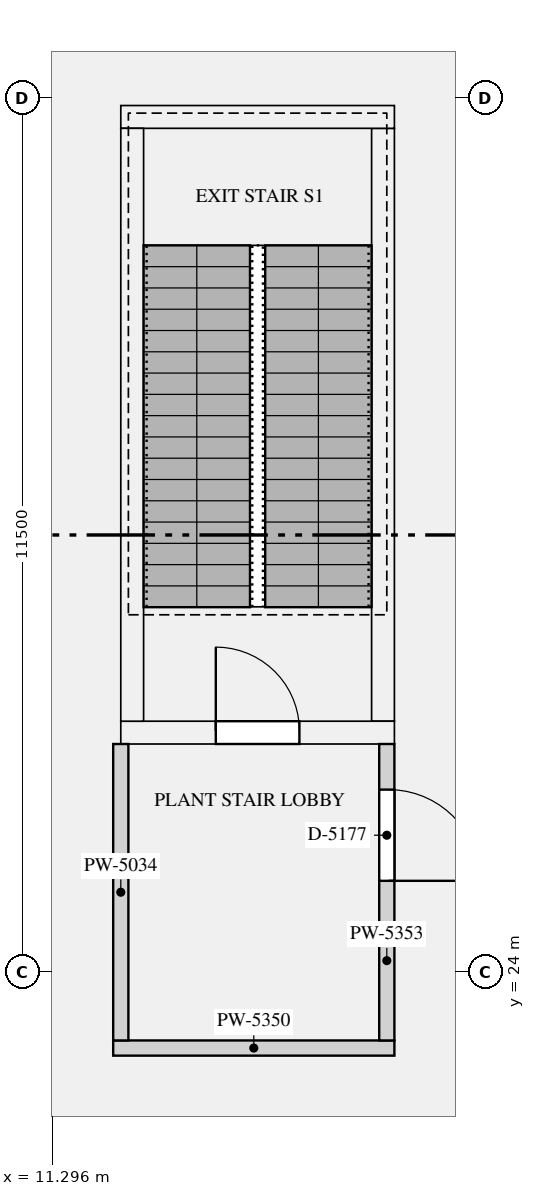
"""IFC4 building model, lengths in metres.
Left out: names, types, materials, properties, quantities, classifications, styles, units other than length and angle.
Written with IfcOpenShell. Run it as: python <this file> out.ifc"""

import sys

from ifc_helpers import new_model, si_unit, direction, frame, frame_2d, origin, origin_2d, place, context, subcontext, project, spatial, rectangle, extrude, element, fill, save


model = new_model("IFC4")
c1 = context("Model", 3, precision=1e-05, world=origin(), true_north=direction((0.0, 1.0)))
c2 = subcontext(c1, "Body", "Model", "MODEL_VIEW")
j1 = project(units=[si_unit("LENGTHUNIT", "METRE"), si_unit("PLANEANGLEUNIT", "RADIAN")], contexts=[c1])
p1 = place(None, origin())
s1 = spatial("IfcSite", under=j1, at=p1, CompositionType="ELEMENT")
p2 = place(p1, origin())
s2 = spatial("IfcBuilding", under=s1, at=p2, CompositionType="ELEMENT")
p3 = place(p2, frame((0.0, 0.0, 185.4)))
s3 = spatial("IfcBuildingStorey", under=s2, at=p3, CompositionType="ELEMENT", Elevation=185.4)
for number, where, z_axis, x_axis in (
    (1, (7.14, 28.5, -0.295), (0.579, 0.0, 0.815), (0.0, 1.0, 0.0)),
    (2, (7.14, 24.5, -0.295), (0.579, 0.0, 0.815), (0.0, 1.0, 0.0)),
):
    element("IfcColumn", number, at=place(p3, frame(where, z_axis=z_axis, x_axis=x_axis)), inside=s3, PredefinedType="USERDEFINED", context=c2, shape_type="SweptSolid", body=[
        extrude(rectangle(XDim=1.0, YDim=0.7, at=origin_2d()), origin(), (0.0, 0.0, 1.0), 7.839),
    ])
p4 = place(p3, frame((12.2, 27.15, 0.0), z_axis=(0.0, 0.0, 1.0), x_axis=(1.0, 0.0, 0.0)))
e3 = element("IfcWall", 3, at=p4, inside=s3, PredefinedType="SHEAR", context=c2, shape_type="SweptSolid", body=[
    extrude(rectangle(XDim=3.6, YDim=0.3, at=frame_2d((1.8, 0.0))), origin(), (0.0, 0.0, 1.0), 6.3),
])
p5 = place(p4, frame((1.25, 0.0, 0.0)))
e4 = element("IfcOpeningElement", 4, at=p5, cuts=e3, PredefinedType="OPENING", context=c2, shape_type="SweptSolid", body=[
    extrude(rectangle(XDim=1.1, YDim=2.1, at=frame_2d((0.55, 1.05))), frame((0.0, 0.16, 0.0), z_axis=(0.0, -1.0, 0.0), x_axis=(1.0, 0.0, 0.0)), (0.0, 0.0, 1.0), 0.32),
])
p6 = place(p3, frame((12.2, 35.25, 0.0), z_axis=(0.0, 0.0, 1.0), x_axis=(1.0, 0.0, 0.0)))
e5 = element("IfcWall", 5, at=p6, inside=s3, PredefinedType="SHEAR", context=c2, shape_type="SweptSolid", body=[
    extrude(rectangle(XDim=3.6, YDim=0.3, at=frame_2d((1.8, 0.0))), origin(), (0.0, 0.0, 1.0), 6.3),
])
for number, where, z_axis, x_axis in (
    (6, (12.35, 27.3, 0.0), (0.0, 0.0, 1.0), (0.0, 1.0, 0.0)),
    (7, (15.65, 27.3, 0.0), (0.0, 0.0, 1.0), (0.0, 1.0, 0.0)),
):
    element("IfcWall", number, at=place(p3, frame(where, z_axis=z_axis, x_axis=x_axis)), inside=s3, PredefinedType="SHEAR", context=c2, shape_type="SweptSolid", body=[
        extrude(rectangle(XDim=7.8, YDim=0.3, at=frame_2d((3.9, 0.0))), origin(), (0.0, 0.0, 1.0), 6.3),
    ])
p7 = place(p3, frame((12.1, 23.0, 0.0), z_axis=(0.0, 0.0, 1.0), x_axis=(1.0, 0.0, 0.0)))
e8 = element("IfcWall", 8, at=p7, inside=s3, PredefinedType="PARTITIONING", context=c2, shape_type="SweptSolid", body=[
    extrude(rectangle(XDim=3.7, YDim=0.2, at=frame_2d((1.85, 0.0))), origin(), (0.0, 0.0, 1.0), 5.8),
])
p8 = place(p3, frame((12.2, 23.1, 0.0), z_axis=(0.0, 0.0, 1.0), x_axis=(0.0, 1.0, 0.0)))
e9 = element("IfcWall", 9, at=p8, inside=s3, PredefinedType="PARTITIONING", context=c2, shape_type="SweptSolid", body=[
    extrude(rectangle(XDim=3.9, YDim=0.2, at=frame_2d((1.95, 0.0))), origin(), (0.0, 0.0, 1.0), 5.8),
])
p9 = place(p3, frame((15.7, 23.1, 0.0), z_axis=(0.0, 0.0, 1.0), x_axis=(0.0, 1.0, 0.0)))
e10 = element("IfcWall", 10, at=p9, inside=s3, PredefinedType="PARTITIONING", context=c2, shape_type="SweptSolid", body=[
    extrude(rectangle(XDim=3.9, YDim=0.2, at=frame_2d((1.95, 0.0))), origin(), (0.0, 0.0, 1.0), 5.8),
])
p10 = place(p9, frame((2.1, 0.0, 0.0)))
e11 = element("IfcOpeningElement", 11, at=p10, cuts=e10, PredefinedType="OPENING", context=c2, shape_type="SweptSolid", body=[
    extrude(rectangle(XDim=1.2, YDim=2.1, at=frame_2d((0.6, 1.05))), frame((0.0, 0.11, 0.0), z_axis=(0.0, -1.0, 0.0), x_axis=(1.0, 0.0, 0.0)), (0.0, 0.0, 1.0), 0.22),
])
p11 = place(p5, origin())
e12 = element("IfcDoor", 12, at=p11, inside=s3, OperationType="SINGLE_SWING_LEFT", PredefinedType="DOOR", context=c2, shape_type="SweptSolid", body=[
    extrude(rectangle(XDim=1.1, YDim=2.1, at=frame_2d((0.55, 1.05))), frame((0.0, 0.025, 0.0), z_axis=(0.0, -1.0, 0.0), x_axis=(1.0, 0.0, 0.0)), (0.0, 0.0, 1.0), 0.05),
])
fill(e4, e12)
p12 = place(p10, frame((1.2, 0.0, 0.0), z_axis=(0.0, 0.0, 1.0), x_axis=(-1.0, 0.0, 0.0)))
e13 = element("IfcDoor", 13, at=p12, inside=s3, OperationType="SINGLE_SWING_RIGHT", PredefinedType="DOOR", context=c2, shape_type="SweptSolid", body=[
    extrude(rectangle(XDim=1.2, YDim=2.1, at=frame_2d((0.6, 1.05))), frame((0.0, 0.025, 0.0), z_axis=(0.0, -1.0, 0.0), x_axis=(1.0, 0.0, 0.0)), (0.0, 0.0, 1.0), 0.05),
])
fill(e11, e13)
save(model, sys.argv[1])
